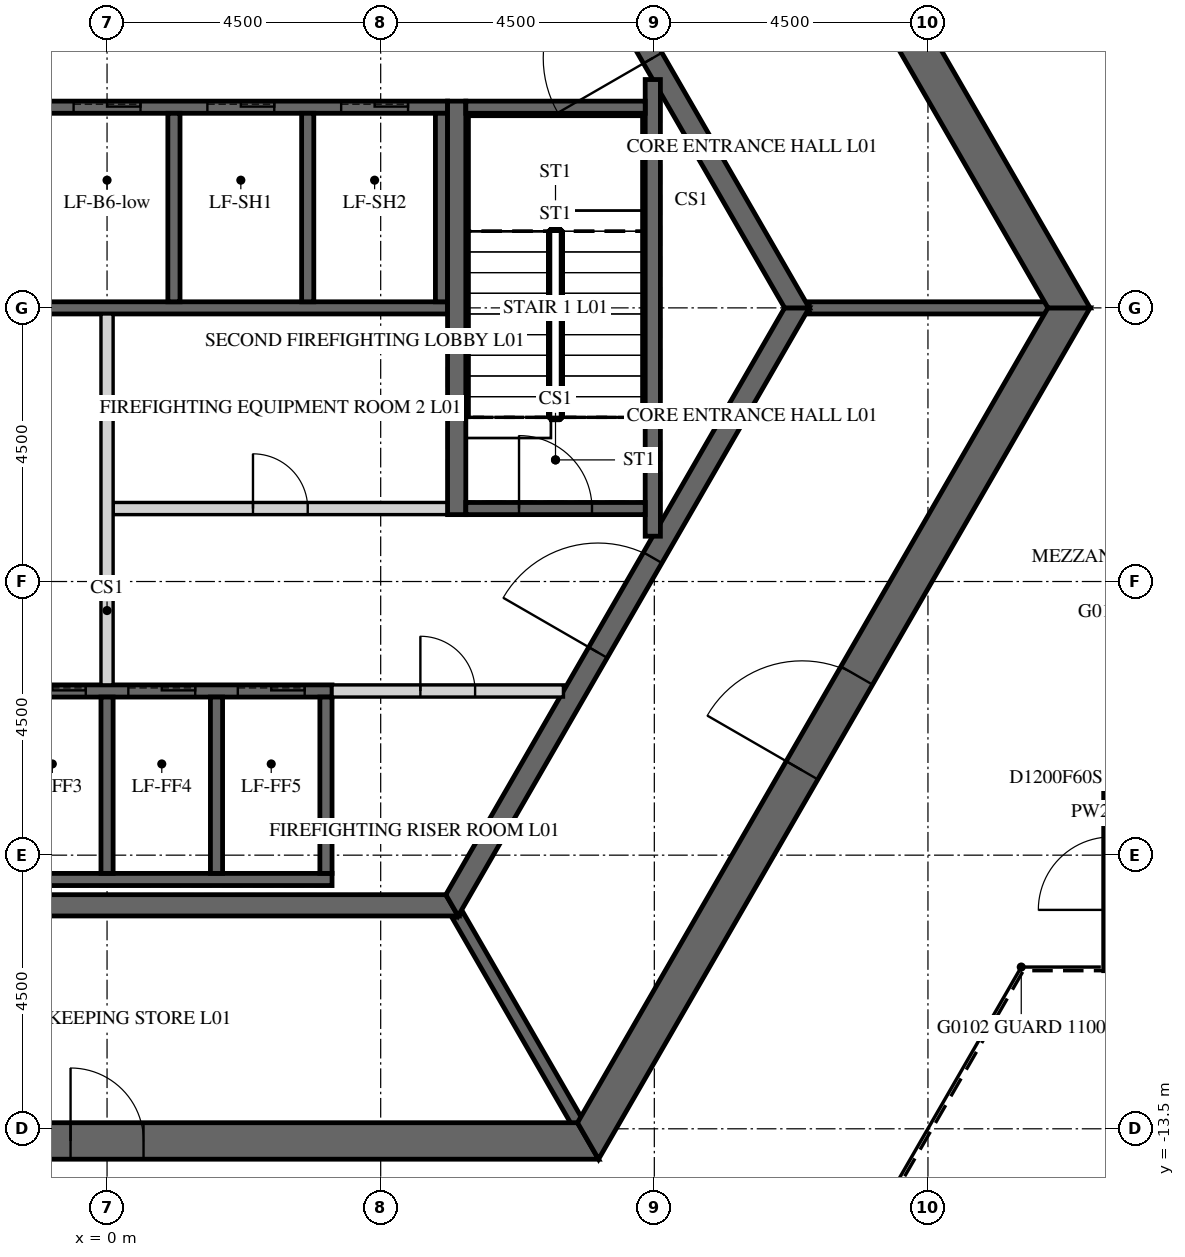
"""IFC4 building model, lengths in metres.
Left out: names, types, materials, properties, quantities, classifications, styles, units other than length and angle.
Written with IfcOpenShell. Run it as: python <this file> out.ifc"""

import sys

from ifc_helpers import new_model, si_unit, direction, frame, frame_2d, origin, place, context, subcontext, project, spatial, polyline, rectangle, outline, extrude, element, fill, save


model = new_model("IFC4")
c1 = context("Model", 3, precision=1e-05, world=origin(), true_north=direction((0.0, 1.0)))
c2 = subcontext(c1, "Body", "Model", "MODEL_VIEW")
j1 = project(units=[si_unit("LENGTHUNIT", "METRE"), si_unit("PLANEANGLEUNIT", "RADIAN")], contexts=[c1])
p1 = place(None, origin())
s1 = spatial("IfcSite", under=j1, at=p1, CompositionType="ELEMENT")
p2 = place(p1, origin())
s2 = spatial("IfcBuilding", under=s1, at=p2, CompositionType="ELEMENT")
p3 = place(p2, frame((0.0, 0.0, 9.0)))
s3 = spatial("IfcBuildingStorey", under=s2, at=p3, CompositionType="ELEMENT", Elevation=9.0)
p4 = place(p3, frame((-7.91, -13.7, -0.25), z_axis=(0.0, 0.0, 1.0), x_axis=(1.0, 0.0, 0.0)))
e1 = element("IfcWall", 1, at=p4, inside=s3, PredefinedType="SHEAR", context=c2, shape_type="SweptSolid", body=[
    extrude(outline(polyline([(-0.173, -0.3), (15.993, -0.3), (15.646, 0.3), (0.173, 0.3), (-0.173, -0.3)])), origin(), (0.0, 0.0, 1.0), 6.0),
])
p5 = place(p4, frame((7.31, 0.0, 0.25)))
e2 = element("IfcOpeningElement", 2, at=p5, cuts=e1, PredefinedType="OPENING", context=c2, shape_type="SweptSolid", body=[
    extrude(rectangle(XDim=1.2, YDim=2.4, at=frame_2d((0.6, 1.2))), frame((0.0, 0.31, 0.0), z_axis=(0.0, -1.0, 0.0), x_axis=(1.0, 0.0, 0.0)), (0.0, 0.0, 1.0), 0.62),
])
p6 = place(p3, frame((7.91, -13.7, -0.25), z_axis=(0.0, 0.0, 1.0), x_axis=(0.499999880136, 0.866025472988, 0.0)))
e3 = element("IfcWall", 3, at=p6, inside=s3, PredefinedType="SHEAR", context=c2, shape_type="SweptSolid", body=[
    extrude(outline(polyline([(-0.173, -0.3), (15.993, -0.3), (15.646, 0.3), (0.173, 0.3), (-0.173, -0.3)])), origin(), (0.0, 0.0, 1.0), 6.0),
])
p7 = place(p6, frame((7.039, 0.0, 0.25)))
e4 = element("IfcOpeningElement", 4, at=p7, cuts=e3, PredefinedType="OPENING", context=c2, shape_type="SweptSolid", body=[
    extrude(rectangle(XDim=1.8, YDim=2.4, at=frame_2d((0.9, 1.2))), frame((0.0, 0.31, 0.0), z_axis=(0.0, -1.0, 0.0), x_axis=(1.0, 0.0, 0.0)), (0.0, 0.0, 1.0), 0.62),
])
p8 = place(p3, frame((15.819, 0.0, -0.25), z_axis=(0.0, 0.0, 1.0), x_axis=(-0.499999880136, 0.866025472988, 0.0)))
e5 = element("IfcWall", 5, at=p8, inside=s3, PredefinedType="SHEAR", context=c2, shape_type="SweptSolid", body=[
    extrude(outline(polyline([(-0.173, -0.3), (15.993, -0.3), (15.646, 0.3), (0.173, 0.3), (-0.173, -0.3)])), origin(), (0.0, 0.0, 1.0), 6.0),
])
p9 = place(p8, frame((6.981, 0.0, 0.25)))
e6 = element("IfcOpeningElement", 6, at=p9, cuts=e5, PredefinedType="OPENING", context=c2, shape_type="SweptSolid", body=[
    extrude(rectangle(XDim=1.8, YDim=2.4, at=frame_2d((0.9, 1.2))), frame((0.0, 0.31, 0.0), z_axis=(0.0, -1.0, 0.0), x_axis=(1.0, 0.0, 0.0)), (0.0, 0.0, 1.0), 0.62),
])
p10 = place(p3, frame((-5.673, -9.825, -0.25), z_axis=(0.0, 0.0, 1.0), x_axis=(1.0, 0.0, 0.0)))
e7 = element("IfcWall", 7, at=p10, inside=s3, PredefinedType="SHEAR", context=c2, shape_type="SweptSolid", body=[
    extrude(outline(polyline([(-0.101, -0.175), (11.446, -0.175), (11.244, 0.175), (0.101, 0.175), (-0.101, -0.175)])), origin(), (0.0, 0.0, 1.0), 6.0),
])
p11 = place(p3, frame((5.673, -9.825, -0.25), z_axis=(0.0, 0.0, 1.0), x_axis=(0.499995046907, 0.866028263435, 0.0)))
e8 = element("IfcWall", 8, at=p11, inside=s3, PredefinedType="SHEAR", context=c2, shape_type="SweptSolid", body=[
    extrude(outline(polyline([(-0.101, -0.175), (11.446, -0.175), (11.244, 0.175), (0.101, 0.175), (-0.101, -0.175)])), origin(), (0.0, 0.0, 1.0), 6.0),
])
p12 = place(p11, frame((4.801, 0.0, 0.25)))
e9 = element("IfcOpeningElement", 9, at=p12, cuts=e8, PredefinedType="OPENING", context=c2, shape_type="SweptSolid", body=[
    extrude(rectangle(XDim=1.8, YDim=2.4, at=frame_2d((0.9, 1.2))), frame((0.0, 0.185, 0.0), z_axis=(0.0, -1.0, 0.0), x_axis=(1.0, 0.0, 0.0)), (0.0, 0.0, 1.0), 0.37),
])
p13 = place(p3, frame((11.345, 0.0, -0.25), z_axis=(0.0, 0.0, 1.0), x_axis=(-0.499995046907, 0.866028263435, 0.0)))
e10 = element("IfcWall", 10, at=p13, inside=s3, PredefinedType="SHEAR", context=c2, shape_type="SweptSolid", body=[
    extrude(outline(polyline([(-0.101, -0.175), (11.446, -0.175), (11.244, 0.175), (0.101, 0.175), (-0.101, -0.175)])), origin(), (0.0, 0.0, 1.0), 6.0),
])
p14 = place(p13, frame((4.744, 0.0, 0.25)))
e11 = element("IfcOpeningElement", 11, at=p14, cuts=e10, PredefinedType="OPENING", context=c2, shape_type="SweptSolid", body=[
    extrude(rectangle(XDim=1.8, YDim=2.4, at=frame_2d((0.9, 1.2))), frame((0.0, 0.185, 0.0), z_axis=(0.0, -1.0, 0.0), x_axis=(1.0, 0.0, 0.0)), (0.0, 0.0, 1.0), 0.37),
])
p15 = place(p3, frame((-5.6, 3.3, -0.25), z_axis=(0.0, 0.0, 1.0), x_axis=(1.0, 0.0, 0.0)))
e12 = element("IfcWall", 12, at=p15, inside=s3, PredefinedType="SHEAR", context=c2, shape_type="SweptSolid", body=[
    extrude(rectangle(XDim=11.2, YDim=0.2, at=frame_2d((5.6, 0.0))), origin(), (0.0, 0.0, 1.0), 6.0),
])
p16 = place(p15, frame((0.65, 0.0, 0.25)))
e13 = element("IfcOpeningElement", 13, at=p16, cuts=e12, PredefinedType="OPENING", context=c2, shape_type="SweptSolid", body=[
    extrude(rectangle(XDim=1.1, YDim=2.1, at=frame_2d((0.55, 1.05))), frame((0.0, 0.11, 0.0), z_axis=(0.0, -1.0, 0.0), x_axis=(1.0, 0.0, 0.0)), (0.0, 0.0, 1.0), 0.22),
])
p17 = place(p15, frame((2.85, 0.0, 0.25)))
e14 = element("IfcOpeningElement", 14, at=p17, cuts=e12, PredefinedType="OPENING", context=c2, shape_type="SweptSolid", body=[
    extrude(rectangle(XDim=1.1, YDim=2.1, at=frame_2d((0.55, 1.05))), frame((0.0, 0.11, 0.0), z_axis=(0.0, -1.0, 0.0), x_axis=(1.0, 0.0, 0.0)), (0.0, 0.0, 1.0), 0.22),
])
p18 = place(p15, frame((5.05, 0.0, 0.25)))
e15 = element("IfcOpeningElement", 15, at=p18, cuts=e12, PredefinedType="OPENING", context=c2, shape_type="SweptSolid", body=[
    extrude(rectangle(XDim=1.1, YDim=2.1, at=frame_2d((0.55, 1.05))), frame((0.0, 0.11, 0.0), z_axis=(0.0, -1.0, 0.0), x_axis=(1.0, 0.0, 0.0)), (0.0, 0.0, 1.0), 0.22),
])
p19 = place(p15, frame((7.25, 0.0, 0.25)))
e16 = element("IfcOpeningElement", 16, at=p19, cuts=e12, PredefinedType="OPENING", context=c2, shape_type="SweptSolid", body=[
    extrude(rectangle(XDim=1.1, YDim=2.1, at=frame_2d((0.55, 1.05))), frame((0.0, 0.11, 0.0), z_axis=(0.0, -1.0, 0.0), x_axis=(1.0, 0.0, 0.0)), (0.0, 0.0, 1.0), 0.22),
])
p20 = place(p15, frame((9.45, 0.0, 0.25)))
e17 = element("IfcOpeningElement", 17, at=p20, cuts=e12, PredefinedType="OPENING", context=c2, shape_type="SweptSolid", body=[
    extrude(rectangle(XDim=1.1, YDim=2.1, at=frame_2d((0.55, 1.05))), frame((0.0, 0.11, 0.0), z_axis=(0.0, -1.0, 0.0), x_axis=(1.0, 0.0, 0.0)), (0.0, 0.0, 1.0), 0.22),
])
p21 = place(p3, frame((-5.6, 0.0, -0.25), z_axis=(0.0, 0.0, 1.0), x_axis=(1.0, 0.0, 0.0)))
e18 = element("IfcWall", 18, at=p21, inside=s3, PredefinedType="SHEAR", context=c2, shape_type="SweptSolid", body=[
    extrude(rectangle(XDim=11.2, YDim=0.2, at=frame_2d((5.6, 0.0))), origin(), (0.0, 0.0, 1.0), 6.0),
])
for number, where, z_axis, x_axis in (
    (19, (1.1, 0.1, -0.25), (0.0, 0.0, 1.0), (0.0, 1.0, 0.0)),
    (20, (3.3, 0.1, -0.25), (0.0, 0.0, 1.0), (0.0, 1.0, 0.0)),
    (21, (5.5, 0.1, -0.25), (0.0, 0.0, 1.0), (0.0, 1.0, 0.0)),
):
    element("IfcWall", number, at=place(p3, frame(where, z_axis=z_axis, x_axis=x_axis)), inside=s3, PredefinedType="SHEAR", context=c2, shape_type="SweptSolid", body=[
        extrude(rectangle(XDim=3.1, YDim=0.2, at=frame_2d((1.55, 0.0))), origin(), (0.0, 0.0, 1.0), 6.0),
    ])
p22 = place(p3, frame((-5.5, -6.3, -0.25), z_axis=(0.0, 0.0, 1.0), x_axis=(1.0, 0.0, 0.0)))
e22 = element("IfcWall", 22, at=p22, inside=s3, PredefinedType="SHEAR", context=c2, shape_type="SweptSolid", body=[
    extrude(rectangle(XDim=9.2, YDim=0.2, at=frame_2d((4.6, 0.0))), origin(), (0.0, 0.0, 1.0), 6.0),
])
p23 = place(p22, frame((0.45, 0.0, 0.25)))
e23 = element("IfcOpeningElement", 23, at=p23, cuts=e22, PredefinedType="OPENING", context=c2, shape_type="SweptSolid", body=[
    extrude(rectangle(XDim=1.1, YDim=2.1, at=frame_2d((0.55, 1.05))), frame((0.0, 0.11, 0.0), z_axis=(0.0, -1.0, 0.0), x_axis=(1.0, 0.0, 0.0)), (0.0, 0.0, 1.0), 0.22),
])
p24 = place(p22, frame((2.25, 0.0, 0.25)))
e24 = element("IfcOpeningElement", 24, at=p24, cuts=e22, PredefinedType="OPENING", context=c2, shape_type="SweptSolid", body=[
    extrude(rectangle(XDim=1.1, YDim=2.1, at=frame_2d((0.55, 1.05))), frame((0.0, 0.11, 0.0), z_axis=(0.0, -1.0, 0.0), x_axis=(1.0, 0.0, 0.0)), (0.0, 0.0, 1.0), 0.22),
])
p25 = place(p22, frame((4.05, 0.0, 0.25)))
e25 = element("IfcOpeningElement", 25, at=p25, cuts=e22, PredefinedType="OPENING", context=c2, shape_type="SweptSolid", body=[
    extrude(rectangle(XDim=1.1, YDim=2.1, at=frame_2d((0.55, 1.05))), frame((0.0, 0.11, 0.0), z_axis=(0.0, -1.0, 0.0), x_axis=(1.0, 0.0, 0.0)), (0.0, 0.0, 1.0), 0.22),
])
p26 = place(p22, frame((5.85, 0.0, 0.25)))
e26 = element("IfcOpeningElement", 26, at=p26, cuts=e22, PredefinedType="OPENING", context=c2, shape_type="SweptSolid", body=[
    extrude(rectangle(XDim=1.1, YDim=2.1, at=frame_2d((0.55, 1.05))), frame((0.0, 0.11, 0.0), z_axis=(0.0, -1.0, 0.0), x_axis=(1.0, 0.0, 0.0)), (0.0, 0.0, 1.0), 0.22),
])
p27 = place(p22, frame((7.65, 0.0, 0.25)))
e27 = element("IfcOpeningElement", 27, at=p27, cuts=e22, PredefinedType="OPENING", context=c2, shape_type="SweptSolid", body=[
    extrude(rectangle(XDim=1.1, YDim=2.1, at=frame_2d((0.55, 1.05))), frame((0.0, 0.11, 0.0), z_axis=(0.0, -1.0, 0.0), x_axis=(1.0, 0.0, 0.0)), (0.0, 0.0, 1.0), 0.22),
])
p28 = place(p3, frame((-5.5, -9.4, -0.25), z_axis=(0.0, 0.0, 1.0), x_axis=(1.0, 0.0, 0.0)))
e28 = element("IfcWall", 28, at=p28, inside=s3, PredefinedType="SHEAR", context=c2, shape_type="SweptSolid", body=[
    extrude(rectangle(XDim=9.2, YDim=0.2, at=frame_2d((4.6, 0.0))), origin(), (0.0, 0.0, 1.0), 6.0),
])
for number, where, z_axis, x_axis in (
    (29, (0.0, -9.3, -0.25), (0.0, 0.0, 1.0), (0.0, 1.0, 0.0)),
    (30, (1.8, -9.3, -0.25), (0.0, 0.0, 1.0), (0.0, 1.0, 0.0)),
    (31, (3.6, -9.3, -0.25), (0.0, 0.0, 1.0), (0.0, 1.0, 0.0)),
):
    element("IfcWall", number, at=place(p3, frame(where, z_axis=z_axis, x_axis=x_axis)), inside=s3, PredefinedType="SHEAR", context=c2, shape_type="SweptSolid", body=[
        extrude(rectangle(XDim=2.9, YDim=0.2, at=frame_2d((1.45, 0.0))), origin(), (0.0, 0.0, 1.0), 6.0),
    ])
p29 = place(p3, frame((0.1, -3.3, 0.0), z_axis=(0.0, 0.0, 1.0), x_axis=(1.0, 0.0, 0.0)))
e32 = element("IfcWall", 32, at=p29, inside=s3, PredefinedType="PARTITIONING", context=c2, shape_type="SweptSolid", body=[
    extrude(rectangle(XDim=5.5, YDim=0.2, at=frame_2d((2.75, 0.0))), origin(), (0.0, 0.0, 1.0), 5.75),
])
p30 = place(p29, frame((2.3, 0.0, 0.0)))
e33 = element("IfcOpeningElement", 33, at=p30, cuts=e32, PredefinedType="OPENING", context=c2, shape_type="SweptSolid", body=[
    extrude(rectangle(XDim=0.9, YDim=2.1, at=frame_2d((0.45, 1.05))), frame((0.0, 0.11, 0.0), z_axis=(0.0, -1.0, 0.0), x_axis=(1.0, 0.0, 0.0)), (0.0, 0.0, 1.0), 0.22),
])
p31 = place(p3, frame((0.0, -6.2, 0.0), z_axis=(0.0, 0.0, 1.0), x_axis=(0.0, 1.0, 0.0)))
e34 = element("IfcWall", 34, at=p31, inside=s3, PredefinedType="PARTITIONING", context=c2, shape_type="SweptSolid", body=[
    extrude(rectangle(XDim=6.1, YDim=0.2, at=frame_2d((3.05, 0.0))), origin(), (0.0, 0.0, 1.0), 5.75),
])
p32 = place(p3, frame((3.7, -6.3, 0.0), z_axis=(0.0, 0.0, 1.0), x_axis=(1.0, 0.0, 0.0)))
e35 = element("IfcWall", 35, at=p32, inside=s3, PredefinedType="PARTITIONING", context=c2, shape_type="SweptSolid", body=[
    extrude(rectangle(XDim=3.806, YDim=0.2, at=frame_2d((1.903, 0.0))), origin(), (0.0, 0.0, 1.0), 5.75),
])
p33 = place(p32, frame((1.453, 0.0, 0.0)))
e36 = element("IfcOpeningElement", 36, at=p33, cuts=e35, PredefinedType="OPENING", context=c2, shape_type="SweptSolid", body=[
    extrude(rectangle(XDim=0.9, YDim=2.1, at=frame_2d((0.45, 1.05))), frame((0.0, 0.11, 0.0), z_axis=(0.0, -1.0, 0.0), x_axis=(1.0, 0.0, 0.0)), (0.0, 0.0, 1.0), 0.22),
])
p34 = place(p3, frame((11.547, 0.0, -0.25), z_axis=(0.0, 0.0, 1.0), x_axis=(1.0, 0.0, 0.0)))
e37 = element("IfcWall", 37, at=p34, inside=s3, PredefinedType="SHEAR", context=c2, shape_type="SweptSolid", body=[
    extrude(rectangle(XDim=3.926, YDim=0.2, at=frame_2d((1.963, 0.0))), origin(), (0.0, 0.0, 1.0), 6.0),
])
p35 = place(p3, frame((5.773, -10.0, -0.25), z_axis=(0.0, 0.0, 1.0), x_axis=(0.500038251005, -0.86600331843, 0.0)))
e38 = element("IfcWall", 38, at=p35, inside=s3, PredefinedType="SHEAR", context=c2, shape_type="SweptSolid", body=[
    extrude(rectangle(XDim=3.926, YDim=0.2, at=frame_2d((1.963, 0.0))), origin(), (0.0, 0.0, 1.0), 6.0),
])
p36 = place(p3, frame((5.75, -3.4, -0.25), z_axis=(0.0, 0.0, 1.0), x_axis=(0.0, 1.0, 0.0)))
e39 = element("IfcWall", 39, at=p36, inside=s3, PredefinedType="SHEAR", context=c2, shape_type="SweptSolid", body=[
    extrude(rectangle(XDim=6.8, YDim=0.3, at=frame_2d((3.4, 0.0))), origin(), (0.0, 0.0, 1.0), 6.0),
])
p37 = place(p3, frame((8.975, -3.755, -0.25), z_axis=(0.0, 0.0, 1.0), x_axis=(0.0, 1.0, 0.0)))
e40 = element("IfcWall", 40, at=p37, inside=s3, PredefinedType="SHEAR", context=c2, shape_type="SweptSolid", body=[
    extrude(rectangle(XDim=7.51, YDim=0.25, at=frame_2d((3.755, 0.0))), origin(), (0.0, 0.0, 1.0), 6.0),
])
p38 = place(p3, frame((5.9, 3.3, -0.25), z_axis=(0.0, 0.0, 1.0), x_axis=(1.0, 0.0, 0.0)))
e41 = element("IfcWall", 41, at=p38, inside=s3, PredefinedType="SHEAR", context=c2, shape_type="SweptSolid", body=[
    extrude(rectangle(XDim=2.95, YDim=0.2, at=frame_2d((1.475, 0.0))), origin(), (0.0, 0.0, 1.0), 6.0),
])
p39 = place(p3, frame((5.9, -3.3, -0.25), z_axis=(0.0, 0.0, 1.0), x_axis=(1.0, 0.0, 0.0)))
e42 = element("IfcWall", 42, at=p39, inside=s3, PredefinedType="SHEAR", context=c2, shape_type="SweptSolid", body=[
    extrude(rectangle(XDim=2.95, YDim=0.2, at=frame_2d((1.475, 0.0))), origin(), (0.0, 0.0, 1.0), 6.0),
])
p40 = place(p39, frame((0.875, 0.0, 0.25)))
e43 = element("IfcOpeningElement", 43, at=p40, cuts=e42, PredefinedType="OPENING", context=c2, shape_type="SweptSolid", body=[
    extrude(rectangle(XDim=1.2, YDim=2.4, at=frame_2d((0.6, 1.2))), frame((0.0, 0.11, 0.0), z_axis=(0.0, -1.0, 0.0), x_axis=(1.0, 0.0, 0.0)), (0.0, 0.0, 1.0), 0.22),
])
p41 = place(p3, frame((16.515, -10.9, 0.0), z_axis=(0.0, 0.0, 1.0), x_axis=(0.0, 1.0, 0.0)))
e44 = element("IfcWall", 44, at=p41, inside=s3, PredefinedType="PARTITIONING", context=c2, shape_type="SweptSolid", body=[
    extrude(rectangle(XDim=3.2, YDim=0.25, at=frame_2d((1.6, 0.0))), origin(), (0.0, 0.0, 1.0), 5.75),
])
p42 = place(p41, frame((1.0, 0.0, 0.0)))
e45 = element("IfcOpeningElement", 45, at=p42, cuts=e44, PredefinedType="OPENING", context=c2, shape_type="SweptSolid", body=[
    extrude(rectangle(XDim=1.2, YDim=2.1, at=frame_2d((0.6, 1.05))), frame((0.0, 0.135, 0.0), z_axis=(0.0, -1.0, 0.0), x_axis=(1.0, 0.0, 0.0)), (0.0, 0.0, 1.0), 0.27),
])
p43 = place(p7, origin())
e46 = element("IfcDoor", 46, at=p43, inside=s3, OperationType="DOUBLE_DOOR_SINGLE_SWING", PredefinedType="DOOR", context=c2, shape_type="SweptSolid", body=[
    extrude(rectangle(XDim=1.8, YDim=2.4, at=frame_2d((0.9, 1.2))), frame((0.0, 0.025, 0.0), z_axis=(0.0, -1.0, 0.0), x_axis=(1.0, 0.0, 0.0)), (0.0, 0.0, 1.0), 0.05),
])
fill(e4, e46)
p44 = place(p5, origin())
e47 = element("IfcDoor", 47, at=p44, inside=s3, OperationType="SINGLE_SWING_LEFT", PredefinedType="DOOR", context=c2, shape_type="SweptSolid", body=[
    extrude(rectangle(XDim=1.2, YDim=2.4, at=frame_2d((0.6, 1.2))), frame((0.0, 0.025, 0.0), z_axis=(0.0, -1.0, 0.0), x_axis=(1.0, 0.0, 0.0)), (0.0, 0.0, 1.0), 0.05),
])
fill(e2, e47)
p45 = place(p14, origin())
e48 = element("IfcDoor", 48, at=p45, inside=s3, OperationType="DOUBLE_DOOR_SINGLE_SWING", PredefinedType="DOOR", context=c2, shape_type="SweptSolid", body=[
    extrude(rectangle(XDim=1.8, YDim=2.4, at=frame_2d((0.9, 1.2))), frame((0.0, 0.025, 0.0), z_axis=(0.0, -1.0, 0.0), x_axis=(1.0, 0.0, 0.0)), (0.0, 0.0, 1.0), 0.05),
])
fill(e11, e48)
p46 = place(p12, origin())
e49 = element("IfcDoor", 49, at=p46, inside=s3, OperationType="DOUBLE_DOOR_SINGLE_SWING", PredefinedType="DOOR", context=c2, shape_type="SweptSolid", body=[
    extrude(rectangle(XDim=1.8, YDim=2.4, at=frame_2d((0.9, 1.2))), frame((0.0, 0.025, 0.0), z_axis=(0.0, -1.0, 0.0), x_axis=(1.0, 0.0, 0.0)), (0.0, 0.0, 1.0), 0.05),
])
fill(e9, e49)
p47 = place(p30, origin())
e50 = element("IfcDoor", 50, at=p47, inside=s3, OperationType="SINGLE_SWING_LEFT", PredefinedType="DOOR", context=c2, shape_type="SweptSolid", body=[
    extrude(rectangle(XDim=0.9, YDim=2.1, at=frame_2d((0.45, 1.05))), frame((0.0, 0.025, 0.0), z_axis=(0.0, -1.0, 0.0), x_axis=(1.0, 0.0, 0.0)), (0.0, 0.0, 1.0), 0.05),
])
fill(e33, e50)
p48 = place(p33, origin())
e51 = element("IfcDoor", 51, at=p48, inside=s3, OperationType="SINGLE_SWING_LEFT", PredefinedType="DOOR", context=c2, shape_type="SweptSolid", body=[
    extrude(rectangle(XDim=0.9, YDim=2.1, at=frame_2d((0.45, 1.05))), frame((0.0, 0.025, 0.0), z_axis=(0.0, -1.0, 0.0), x_axis=(1.0, 0.0, 0.0)), (0.0, 0.0, 1.0), 0.05),
])
fill(e36, e51)
p49 = place(p40, origin())
e52 = element("IfcDoor", 52, at=p49, inside=s3, OperationType="SINGLE_SWING_LEFT", PredefinedType="DOOR", context=c2, shape_type="SweptSolid", body=[
    extrude(rectangle(XDim=1.2, YDim=2.4, at=frame_2d((0.6, 1.2))), frame((0.0, 0.025, 0.0), z_axis=(0.0, -1.0, 0.0), x_axis=(1.0, 0.0, 0.0)), (0.0, 0.0, 1.0), 0.05),
])
fill(e43, e52)
p50 = place(p18, origin())
e53 = element("IfcDoor", 53, at=p50, inside=s3, OperationType="SLIDING_TO_LEFT", PredefinedType="DOOR", context=c2, shape_type="SweptSolid", body=[
    extrude(rectangle(XDim=1.1, YDim=2.1, at=frame_2d((0.55, 1.05))), frame((0.0, 0.025, 0.0), z_axis=(0.0, -1.0, 0.0), x_axis=(1.0, 0.0, 0.0)), (0.0, 0.0, 1.0), 0.05),
])
fill(e15, e53)
p51 = place(p19, origin())
e54 = element("IfcDoor", 54, at=p51, inside=s3, OperationType="SLIDING_TO_LEFT", PredefinedType="DOOR", context=c2, shape_type="SweptSolid", body=[
    extrude(rectangle(XDim=1.1, YDim=2.1, at=frame_2d((0.55, 1.05))), frame((0.0, 0.025, 0.0), z_axis=(0.0, -1.0, 0.0), x_axis=(1.0, 0.0, 0.0)), (0.0, 0.0, 1.0), 0.05),
])
fill(e16, e54)
p52 = place(p20, origin())
e55 = element("IfcDoor", 55, at=p52, inside=s3, OperationType="SLIDING_TO_LEFT", PredefinedType="DOOR", context=c2, shape_type="SweptSolid", body=[
    extrude(rectangle(XDim=1.1, YDim=2.1, at=frame_2d((0.55, 1.05))), frame((0.0, 0.025, 0.0), z_axis=(0.0, -1.0, 0.0), x_axis=(1.0, 0.0, 0.0)), (0.0, 0.0, 1.0), 0.05),
])
fill(e17, e55)
p53 = place(p25, origin())
e56 = element("IfcDoor", 56, at=p53, inside=s3, OperationType="SLIDING_TO_LEFT", PredefinedType="DOOR", context=c2, shape_type="SweptSolid", body=[
    extrude(rectangle(XDim=1.1, YDim=2.1, at=frame_2d((0.55, 1.05))), frame((0.0, 0.025, 0.0), z_axis=(0.0, -1.0, 0.0), x_axis=(1.0, 0.0, 0.0)), (0.0, 0.0, 1.0), 0.05),
])
fill(e25, e56)
p54 = place(p26, origin())
e57 = element("IfcDoor", 57, at=p54, inside=s3, OperationType="SLIDING_TO_LEFT", PredefinedType="DOOR", context=c2, shape_type="SweptSolid", body=[
    extrude(rectangle(XDim=1.1, YDim=2.1, at=frame_2d((0.55, 1.05))), frame((0.0, 0.025, 0.0), z_axis=(0.0, -1.0, 0.0), x_axis=(1.0, 0.0, 0.0)), (0.0, 0.0, 1.0), 0.05),
])
fill(e26, e57)
p55 = place(p27, origin())
e58 = element("IfcDoor", 58, at=p55, inside=s3, OperationType="SLIDING_TO_LEFT", PredefinedType="DOOR", context=c2, shape_type="SweptSolid", body=[
    extrude(rectangle(XDim=1.1, YDim=2.1, at=frame_2d((0.55, 1.05))), frame((0.0, 0.025, 0.0), z_axis=(0.0, -1.0, 0.0), x_axis=(1.0, 0.0, 0.0)), (0.0, 0.0, 1.0), 0.05),
])
fill(e27, e58)
save(model, sys.argv[1])
